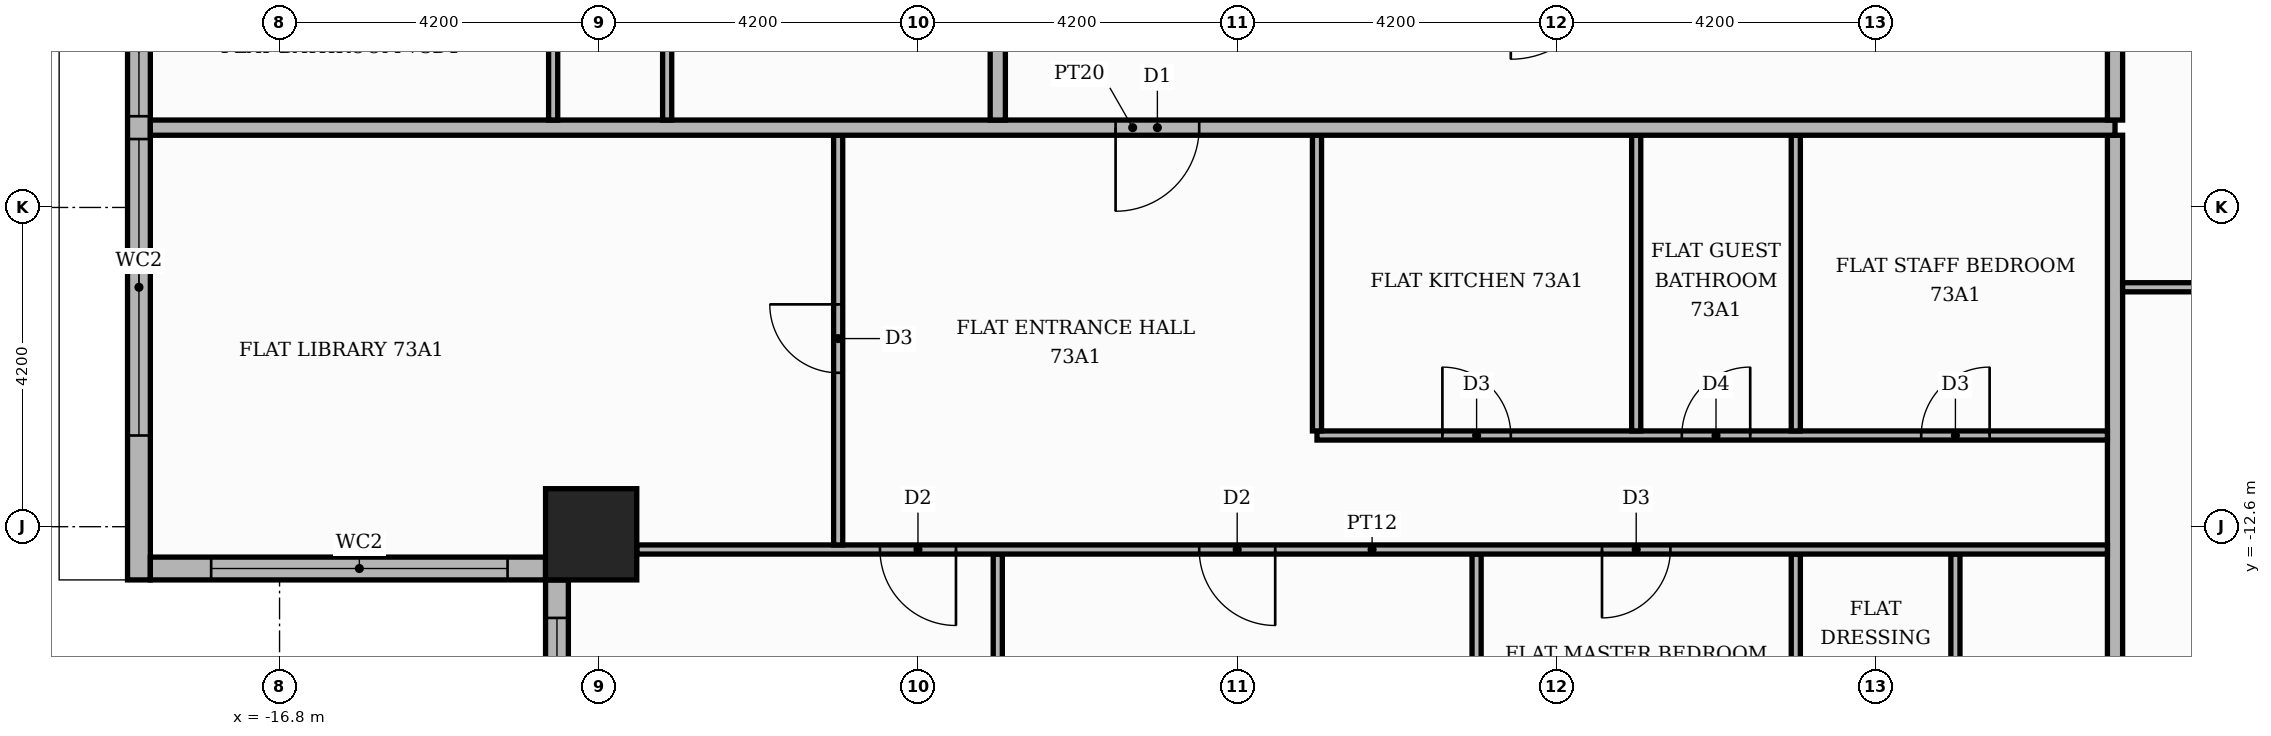
"""IFC4 building model, lengths in metres.
Left out: names, types, materials, properties, quantities, classifications, styles, units other than length and angle.
Written with IfcOpenShell. Run it as: python <this file> out.ifc"""

import sys

from ifc_helpers import new_model, si_unit, direction, frame, frame_2d, origin, origin_2d, place, context, subcontext, project, spatial, rectangle, extrude, element, fill, save


model = new_model("IFC4")
c1 = context("Model", 3, precision=1e-05, world=origin(), true_north=direction((0.0, 1.0)))
c2 = subcontext(c1, "Body", "Model", "MODEL_VIEW")
j1 = project(units=[si_unit("LENGTHUNIT", "METRE"), si_unit("PLANEANGLEUNIT", "RADIAN")], contexts=[c1])
p1 = place(None, origin())
s1 = spatial("IfcSite", under=j1, at=p1, CompositionType="ELEMENT")
p2 = place(p1, origin())
s2 = spatial("IfcBuilding", under=s1, at=p2, CompositionType="ELEMENT")
p3 = place(p2, frame((0.0, 0.0, 304.5)))
s3 = spatial("IfcBuildingStorey", under=s2, at=p3, CompositionType="ELEMENT", Elevation=304.5)
p4 = place(p3, frame((-12.7, -12.7, 0.0), z_axis=(0.0, 0.0, 1.0), x_axis=(1.0, 0.0, 0.0)))
e1 = element("IfcColumn", 1, at=p4, inside=s3, PredefinedType="COLUMN", context=c2, shape_type="SweptSolid", body=[
    extrude(rectangle(XDim=1.2, YDim=1.2, at=origin_2d()), origin(), (0.0, 0.0, 1.0), 3.9),
])
p5 = place(p3, frame((-18.65, 13.0, 0.0), z_axis=(0.0, 0.0, 1.0), x_axis=(0.0, -1.0, 0.0)))
e2 = element("IfcWall", 2, at=p5, inside=s3, PredefinedType="STANDARD", context=c2, shape_type="SweptSolid", body=[
    extrude(rectangle(XDim=26.3, YDim=0.3, at=frame_2d((13.15, 0.0))), origin(), (0.0, 0.0, 1.0), 3.55),
])
p6 = place(p5, frame((1.6, 0.0, 0.6)))
e3 = element("IfcOpeningElement", 3, at=p6, cuts=e2, PredefinedType="OPENING", context=c2, shape_type="SweptSolid", body=[
    extrude(rectangle(XDim=6.0, YDim=2.4, at=frame_2d((3.0, 1.2))), frame((0.0, 0.16, 0.0), z_axis=(0.0, -1.0, 0.0), x_axis=(1.0, 0.0, 0.0)), (0.0, 0.0, 1.0), 0.32),
])
p7 = place(p5, frame((7.9, 0.0, 0.6)))
e4 = element("IfcOpeningElement", 4, at=p7, cuts=e2, PredefinedType="OPENING", context=c2, shape_type="SweptSolid", body=[
    extrude(rectangle(XDim=6.0, YDim=2.4, at=frame_2d((3.0, 1.2))), frame((0.0, 0.16, 0.0), z_axis=(0.0, -1.0, 0.0), x_axis=(1.0, 0.0, 0.0)), (0.0, 0.0, 1.0), 0.32),
])
p8 = place(p5, frame((14.2, 0.0, 0.6)))
e5 = element("IfcOpeningElement", 5, at=p8, cuts=e2, PredefinedType="OPENING", context=c2, shape_type="SweptSolid", body=[
    extrude(rectangle(XDim=1.8, YDim=2.4, at=frame_2d((0.9, 1.2))), frame((0.0, 0.16, 0.0), z_axis=(0.0, -1.0, 0.0), x_axis=(1.0, 0.0, 0.0)), (0.0, 0.0, 1.0), 0.32),
])
p9 = place(p5, frame((16.3, 0.0, 0.6)))
e6 = element("IfcOpeningElement", 6, at=p9, cuts=e2, PredefinedType="OPENING", context=c2, shape_type="SweptSolid", body=[
    extrude(rectangle(XDim=1.8, YDim=2.4, at=frame_2d((0.9, 1.2))), frame((0.0, 0.16, 0.0), z_axis=(0.0, -1.0, 0.0), x_axis=(1.0, 0.0, 0.0)), (0.0, 0.0, 1.0), 0.32),
])
p10 = place(p5, frame((18.4, 0.0, 0.6)))
e7 = element("IfcOpeningElement", 7, at=p10, cuts=e2, PredefinedType="OPENING", context=c2, shape_type="SweptSolid", body=[
    extrude(rectangle(XDim=1.8, YDim=2.4, at=frame_2d((0.9, 1.2))), frame((0.0, 0.16, 0.0), z_axis=(0.0, -1.0, 0.0), x_axis=(1.0, 0.0, 0.0)), (0.0, 0.0, 1.0), 0.32),
])
p11 = place(p5, frame((20.5, 0.0, 0.6)))
e8 = element("IfcOpeningElement", 8, at=p11, cuts=e2, PredefinedType="OPENING", context=c2, shape_type="SweptSolid", body=[
    extrude(rectangle(XDim=3.9, YDim=2.4, at=frame_2d((1.95, 1.2))), frame((0.0, 0.16, 0.0), z_axis=(0.0, -1.0, 0.0), x_axis=(1.0, 0.0, 0.0)), (0.0, 0.0, 1.0), 0.32),
])
p12 = place(p3, frame((-18.5, -13.15, 0.0), z_axis=(0.0, 0.0, 1.0), x_axis=(1.0, 0.0, 0.0)))
e9 = element("IfcWall", 9, at=p12, inside=s3, PredefinedType="STANDARD", context=c2, shape_type="SweptSolid", body=[
    extrude(rectangle(XDim=5.2, YDim=0.3, at=frame_2d((2.6, 0.0))), origin(), (0.0, 0.0, 1.0), 3.55),
])
p13 = place(p12, frame((0.8, 0.0, 0.6)))
e10 = element("IfcOpeningElement", 10, at=p13, cuts=e9, PredefinedType="OPENING", context=c2, shape_type="SweptSolid", body=[
    extrude(rectangle(XDim=3.9, YDim=2.4, at=frame_2d((1.95, 1.2))), frame((0.0, 0.16, 0.0), z_axis=(0.0, -1.0, 0.0), x_axis=(1.0, 0.0, 0.0)), (0.0, 0.0, 1.0), 0.32),
])
p14 = place(p3, frame((-13.15, -13.3, 0.0), z_axis=(0.0, 0.0, 1.0), x_axis=(0.0, -1.0, 0.0)))
e11 = element("IfcWall", 11, at=p14, inside=s3, PredefinedType="STANDARD", context=c2, shape_type="SweptSolid", body=[
    extrude(rectangle(XDim=5.5, YDim=0.3, at=frame_2d((2.75, 0.0))), origin(), (0.0, 0.0, 1.0), 3.55),
])
p15 = place(p14, frame((0.5, 0.0, 0.6)))
e12 = element("IfcOpeningElement", 12, at=p15, cuts=e11, PredefinedType="OPENING", context=c2, shape_type="SweptSolid", body=[
    extrude(rectangle(XDim=3.9, YDim=2.4, at=frame_2d((1.95, 1.2))), frame((0.0, 0.16, 0.0), z_axis=(0.0, -1.0, 0.0), x_axis=(1.0, 0.0, 0.0)), (0.0, 0.0, 1.0), 0.32),
])
p16 = place(p3, frame((-7.35, -18.5, 0.0), z_axis=(0.0, 0.0, 1.0), x_axis=(0.0, 1.0, 0.0)))
e13 = element("IfcWall", 13, at=p16, inside=s3, PredefinedType="PARTITIONING", context=c2, shape_type="SweptSolid", body=[
    extrude(rectangle(XDim=5.54, YDim=0.12, at=frame_2d((2.77, 0.0))), origin(), (0.0, 0.0, 1.0), 3.55),
])
p17 = place(p3, frame((3.15, -18.5, 0.0), z_axis=(0.0, 0.0, 1.0), x_axis=(0.0, 1.0, 0.0)))
e14 = element("IfcWall", 14, at=p17, inside=s3, PredefinedType="PARTITIONING", context=c2, shape_type="SweptSolid", body=[
    extrude(rectangle(XDim=5.54, YDim=0.12, at=frame_2d((2.77, 0.0))), origin(), (0.0, 0.0, 1.0), 3.55),
])
p18 = place(p17, frame((2.2, 0.0, 0.0)))
e15 = element("IfcOpeningElement", 15, at=p18, cuts=e14, PredefinedType="OPENING", context=c2, shape_type="SweptSolid", body=[
    extrude(rectangle(XDim=0.9, YDim=2.1, at=frame_2d((0.45, 1.05))), frame((0.0, 0.07, 0.0), z_axis=(0.0, -1.0, 0.0), x_axis=(1.0, 0.0, 0.0)), (0.0, 0.0, 1.0), 0.14),
])
p19 = place(p3, frame((5.25, -18.5, 0.0), z_axis=(0.0, 0.0, 1.0), x_axis=(0.0, 1.0, 0.0)))
e16 = element("IfcWall", 16, at=p19, inside=s3, PredefinedType="PARTITIONING", context=c2, shape_type="SweptSolid", body=[
    extrude(rectangle(XDim=5.54, YDim=0.12, at=frame_2d((2.77, 0.0))), origin(), (0.0, 0.0, 1.0), 3.55),
])
p20 = place(p19, frame((2.2, 0.0, 0.0)))
e17 = element("IfcOpeningElement", 17, at=p20, cuts=e16, PredefinedType="OPENING", context=c2, shape_type="SweptSolid", body=[
    extrude(rectangle(XDim=0.9, YDim=2.1, at=frame_2d((0.45, 1.05))), frame((0.0, 0.07, 0.0), z_axis=(0.0, -1.0, 0.0), x_axis=(1.0, 0.0, 0.0)), (0.0, 0.0, 1.0), 0.14),
])
p21 = place(p3, frame((7.35, -18.5, 0.0), z_axis=(0.0, 0.0, 1.0), x_axis=(0.0, 1.0, 0.0)))
e18 = element("IfcWall", 18, at=p21, inside=s3, PredefinedType="PARTITIONING", context=c2, shape_type="SweptSolid", body=[
    extrude(rectangle(XDim=11.05, YDim=0.2, at=frame_2d((5.525, 0.0))), origin(), (0.0, 0.0, 1.0), 3.55),
])
p22 = place(p3, frame((-1.05, -16.889, 0.0), z_axis=(0.0, 0.0, 1.0), x_axis=(0.0, 1.0, 0.0)))
e19 = element("IfcWall", 19, at=p22, inside=s3, PredefinedType="PARTITIONING", context=c2, shape_type="SweptSolid", body=[
    extrude(rectangle(XDim=3.929, YDim=0.12, at=frame_2d((1.964, 0.0))), origin(), (0.0, 0.0, 1.0), 3.55),
])
p23 = place(p3, frame((-12.1, -12.9, 0.0), z_axis=(0.0, 0.0, 1.0), x_axis=(1.0, 0.0, 0.0)))
e20 = element("IfcWall", 20, at=p23, inside=s3, PredefinedType="PARTITIONING", context=c2, shape_type="SweptSolid", body=[
    extrude(rectangle(XDim=19.35, YDim=0.12, at=frame_2d((9.675, 0.0))), origin(), (0.0, 0.0, 1.0), 3.55),
])
p24 = place(p23, frame((3.2, 0.0, 0.0)))
e21 = element("IfcOpeningElement", 21, at=p24, cuts=e20, PredefinedType="OPENING", context=c2, shape_type="SweptSolid", body=[
    extrude(rectangle(XDim=1.0, YDim=2.1, at=frame_2d((0.5, 1.05))), frame((0.0, 0.07, 0.0), z_axis=(0.0, -1.0, 0.0), x_axis=(1.0, 0.0, 0.0)), (0.0, 0.0, 1.0), 0.14),
])
p25 = place(p23, frame((7.4, 0.0, 0.0)))
e22 = element("IfcOpeningElement", 22, at=p25, cuts=e20, PredefinedType="OPENING", context=c2, shape_type="SweptSolid", body=[
    extrude(rectangle(XDim=1.0, YDim=2.1, at=frame_2d((0.5, 1.05))), frame((0.0, 0.07, 0.0), z_axis=(0.0, -1.0, 0.0), x_axis=(1.0, 0.0, 0.0)), (0.0, 0.0, 1.0), 0.14),
])
p26 = place(p23, frame((12.7, 0.0, 0.0)))
e23 = element("IfcOpeningElement", 23, at=p26, cuts=e20, PredefinedType="OPENING", context=c2, shape_type="SweptSolid", body=[
    extrude(rectangle(XDim=0.9, YDim=2.1, at=frame_2d((0.45, 1.05))), frame((0.0, 0.07, 0.0), z_axis=(0.0, -1.0, 0.0), x_axis=(1.0, 0.0, 0.0)), (0.0, 0.0, 1.0), 0.14),
])
p27 = place(p3, frame((-9.45, -12.84, 0.0), z_axis=(0.0, 0.0, 1.0), x_axis=(0.0, 1.0, 0.0)))
e24 = element("IfcWall", 24, at=p27, inside=s3, PredefinedType="PARTITIONING", context=c2, shape_type="SweptSolid", body=[
    extrude(rectangle(XDim=5.39, YDim=0.12, at=frame_2d((2.695, 0.0))), origin(), (0.0, 0.0, 1.0), 3.55),
])
p28 = place(p27, frame((2.265, 0.0, 0.0)))
e25 = element("IfcOpeningElement", 25, at=p28, cuts=e24, PredefinedType="OPENING", context=c2, shape_type="SweptSolid", body=[
    extrude(rectangle(XDim=0.9, YDim=2.1, at=frame_2d((0.45, 1.05))), frame((0.0, 0.07, 0.0), z_axis=(0.0, -1.0, 0.0), x_axis=(1.0, 0.0, 0.0)), (0.0, 0.0, 1.0), 0.14),
])
p29 = place(p3, frame((-3.15, -11.4, 0.0), z_axis=(0.0, 0.0, 1.0), x_axis=(1.0, 0.0, 0.0)))
e26 = element("IfcWall", 26, at=p29, inside=s3, PredefinedType="PARTITIONING", context=c2, shape_type="SweptSolid", body=[
    extrude(rectangle(XDim=10.4, YDim=0.12, at=frame_2d((5.2, 0.0))), origin(), (0.0, 0.0, 1.0), 3.55),
])
p30 = place(p29, frame((1.65, 0.0, 0.0)))
e27 = element("IfcOpeningElement", 27, at=p30, cuts=e26, PredefinedType="OPENING", context=c2, shape_type="SweptSolid", body=[
    extrude(rectangle(XDim=0.9, YDim=2.1, at=frame_2d((0.45, 1.05))), frame((0.0, 0.07, 0.0), z_axis=(0.0, -1.0, 0.0), x_axis=(1.0, 0.0, 0.0)), (0.0, 0.0, 1.0), 0.14),
])
p31 = place(p29, frame((4.8, 0.0, 0.0)))
e28 = element("IfcOpeningElement", 28, at=p31, cuts=e26, PredefinedType="OPENING", context=c2, shape_type="SweptSolid", body=[
    extrude(rectangle(XDim=0.9, YDim=2.1, at=frame_2d((0.45, 1.05))), frame((0.0, 0.07, 0.0), z_axis=(0.0, -1.0, 0.0), x_axis=(1.0, 0.0, 0.0)), (0.0, 0.0, 1.0), 0.14),
])
p32 = place(p29, frame((7.95, 0.0, 0.0)))
e29 = element("IfcOpeningElement", 29, at=p32, cuts=e26, PredefinedType="OPENING", context=c2, shape_type="SweptSolid", body=[
    extrude(rectangle(XDim=0.9, YDim=2.1, at=frame_2d((0.45, 1.05))), frame((0.0, 0.07, 0.0), z_axis=(0.0, -1.0, 0.0), x_axis=(1.0, 0.0, 0.0)), (0.0, 0.0, 1.0), 0.14),
])
for number, where, z_axis, x_axis in (
    (30, (-3.15, -11.34, 0.0), (0.0, 0.0, 1.0), (0.0, 1.0, 0.0)),
    (31, (1.05, -11.34, 0.0), (0.0, 0.0, 1.0), (0.0, 1.0, 0.0)),
    (32, (3.15, -11.34, 0.0), (0.0, 0.0, 1.0), (0.0, 1.0, 0.0)),
):
    element("IfcWall", number, at=place(p3, frame(where, z_axis=z_axis, x_axis=x_axis)), inside=s3, PredefinedType="PARTITIONING", context=c2, shape_type="SweptSolid", body=[
        extrude(rectangle(XDim=3.89, YDim=0.12, at=frame_2d((1.945, 0.0))), origin(), (0.0, 0.0, 1.0), 3.55),
    ])
p33 = place(p3, frame((7.45, -9.45, 0.0), z_axis=(0.0, 0.0, 1.0), x_axis=(1.0, 0.0, 0.0)))
e33 = element("IfcWall", 33, at=p33, inside=s3, PredefinedType="PARTITIONING", context=c2, shape_type="SweptSolid", body=[
    extrude(rectangle(XDim=6.05, YDim=0.12, at=frame_2d((3.025, 0.0))), origin(), (0.0, 0.0, 1.0), 3.55),
])
p34 = place(p33, frame((2.475, 0.0, 0.0)))
e34 = element("IfcOpeningElement", 34, at=p34, cuts=e33, PredefinedType="OPENING", context=c2, shape_type="SweptSolid", body=[
    extrude(rectangle(XDim=1.0, YDim=2.1, at=frame_2d((0.5, 1.05))), frame((0.0, 0.07, 0.0), z_axis=(0.0, -1.0, 0.0), x_axis=(1.0, 0.0, 0.0)), (0.0, 0.0, 1.0), 0.14),
])
p35 = place(p3, frame((-18.5, -7.35, 0.0), z_axis=(0.0, 0.0, 1.0), x_axis=(1.0, 0.0, 0.0)))
e35 = element("IfcWall", 35, at=p35, inside=s3, PredefinedType="PARTITIONING", context=c2, shape_type="SweptSolid", body=[
    extrude(rectangle(XDim=25.85, YDim=0.2, at=frame_2d((12.925, 0.0))), origin(), (0.0, 0.0, 1.0), 3.55),
])
p36 = place(p35, frame((12.7, 0.0, 0.0)))
e36 = element("IfcOpeningElement", 36, at=p36, cuts=e35, PredefinedType="OPENING", context=c2, shape_type="SweptSolid", body=[
    extrude(rectangle(XDim=1.1, YDim=2.4, at=frame_2d((0.55, 1.2))), frame((0.0, 0.11, 0.0), z_axis=(0.0, -1.0, 0.0), x_axis=(1.0, 0.0, 0.0)), (0.0, 0.0, 1.0), 0.22),
])
p37 = place(p3, frame((-13.2, -7.25, 0.0), z_axis=(0.0, 0.0, 1.0), x_axis=(0.0, 1.0, 0.0)))
e37 = element("IfcWall", 37, at=p37, inside=s3, PredefinedType="PARTITIONING", context=c2, shape_type="SweptSolid", body=[
    extrude(rectangle(XDim=1.94, YDim=0.12, at=frame_2d((0.97, 0.0))), origin(), (0.0, 0.0, 1.0), 3.55),
])
p38 = place(p3, frame((-11.7, -7.25, 0.0), z_axis=(0.0, 0.0, 1.0), x_axis=(0.0, 1.0, 0.0)))
e38 = element("IfcWall", 38, at=p38, inside=s3, PredefinedType="PARTITIONING", context=c2, shape_type="SweptSolid", body=[
    extrude(rectangle(XDim=3.44, YDim=0.12, at=frame_2d((1.72, 0.0))), origin(), (0.0, 0.0, 1.0), 3.55),
])
p39 = place(p38, frame((1.25, 0.0, 0.0)))
e39 = element("IfcOpeningElement", 39, at=p39, cuts=e38, PredefinedType="OPENING", context=c2, shape_type="SweptSolid", body=[
    extrude(rectangle(XDim=0.9, YDim=2.1, at=frame_2d((0.45, 1.05))), frame((0.0, 0.07, 0.0), z_axis=(0.0, -1.0, 0.0), x_axis=(1.0, 0.0, 0.0)), (0.0, 0.0, 1.0), 0.14),
])
p40 = place(p3, frame((-7.35, -7.25, 0.0), z_axis=(0.0, 0.0, 1.0), x_axis=(0.0, 1.0, 0.0)))
e40 = element("IfcWall", 40, at=p40, inside=s3, PredefinedType="PARTITIONING", context=c2, shape_type="SweptSolid", body=[
    extrude(rectangle(XDim=14.5, YDim=0.2, at=frame_2d((7.25, 0.0))), origin(), (0.0, 0.0, 1.0), 3.55),
])
p41 = place(p40, frame((10.9, 0.0, 0.0)))
e41 = element("IfcOpeningElement", 41, at=p41, cuts=e40, PredefinedType="OPENING", context=c2, shape_type="SweptSolid", body=[
    extrude(rectangle(XDim=1.1, YDim=2.4, at=frame_2d((0.55, 1.2))), frame((0.0, 0.11, 0.0), z_axis=(0.0, -1.0, 0.0), x_axis=(1.0, 0.0, 0.0)), (0.0, 0.0, 1.0), 0.22),
])
p42 = place(p3, frame((7.35, -7.25, 0.0), z_axis=(0.0, 0.0, 1.0), x_axis=(0.0, 1.0, 0.0)))
e42 = element("IfcWall", 42, at=p42, inside=s3, PredefinedType="PARTITIONING", context=c2, shape_type="SweptSolid", body=[
    extrude(rectangle(XDim=14.5, YDim=0.2, at=frame_2d((7.25, 0.0))), origin(), (0.0, 0.0, 1.0), 3.55),
])
p43 = place(p42, frame((1.45, 0.0, 0.0)))
e43 = element("IfcOpeningElement", 43, at=p43, cuts=e42, PredefinedType="OPENING", context=c2, shape_type="SweptSolid", body=[
    extrude(rectangle(XDim=1.1, YDim=2.4, at=frame_2d((0.55, 1.2))), frame((0.0, 0.11, 0.0), z_axis=(0.0, -1.0, 0.0), x_axis=(1.0, 0.0, 0.0)), (0.0, 0.0, 1.0), 0.22),
])
p44 = place(p10, origin())
e44 = element("IfcWindow", 44, at=p44, inside=s3, PartitioningType="SINGLE_PANEL", PredefinedType="WINDOW", context=c2, shape_type="SweptSolid", body=[
    extrude(rectangle(XDim=1.8, YDim=2.4, at=frame_2d((0.9, 1.2))), frame((0.0, 0.03, 0.0), z_axis=(0.0, -1.0, 0.0), x_axis=(1.0, 0.0, 0.0)), (0.0, 0.0, 1.0), 0.06),
])
fill(e7, e44)
p45 = place(p11, origin())
e45 = element("IfcWindow", 45, at=p45, inside=s3, PartitioningType="SINGLE_PANEL", PredefinedType="WINDOW", context=c2, shape_type="SweptSolid", body=[
    extrude(rectangle(XDim=3.9, YDim=2.4, at=frame_2d((1.95, 1.2))), frame((0.0, 0.03, 0.0), z_axis=(0.0, -1.0, 0.0), x_axis=(1.0, 0.0, 0.0)), (0.0, 0.0, 1.0), 0.06),
])
fill(e8, e45)
p46 = place(p13, origin())
e46 = element("IfcWindow", 46, at=p46, inside=s3, PartitioningType="SINGLE_PANEL", PredefinedType="WINDOW", context=c2, shape_type="SweptSolid", body=[
    extrude(rectangle(XDim=3.9, YDim=2.4, at=frame_2d((1.95, 1.2))), frame((0.0, 0.03, 0.0), z_axis=(0.0, -1.0, 0.0), x_axis=(1.0, 0.0, 0.0)), (0.0, 0.0, 1.0), 0.06),
])
fill(e10, e46)
p47 = place(p15, origin())
e47 = element("IfcWindow", 47, at=p47, inside=s3, PartitioningType="SINGLE_PANEL", PredefinedType="WINDOW", context=c2, shape_type="SweptSolid", body=[
    extrude(rectangle(XDim=3.9, YDim=2.4, at=frame_2d((1.95, 1.2))), frame((0.0, 0.03, 0.0), z_axis=(0.0, -1.0, 0.0), x_axis=(1.0, 0.0, 0.0)), (0.0, 0.0, 1.0), 0.06),
])
fill(e12, e47)
p48 = place(p36, frame((1.1, 0.0, 0.0), z_axis=(0.0, 0.0, 1.0), x_axis=(-1.0, 0.0, 0.0)))
e48 = element("IfcDoor", 48, at=p48, inside=s3, OperationType="SINGLE_SWING_LEFT", PredefinedType="DOOR", context=c2, shape_type="SweptSolid", body=[
    extrude(rectangle(XDim=1.1, YDim=2.4, at=frame_2d((0.55, 1.2))), frame((0.0, 0.025, 0.0), z_axis=(0.0, -1.0, 0.0), x_axis=(1.0, 0.0, 0.0)), (0.0, 0.0, 1.0), 0.05),
])
fill(e36, e48)
p49 = place(p28, origin())
e49 = element("IfcDoor", 49, at=p49, inside=s3, OperationType="SINGLE_SWING_RIGHT", PredefinedType="DOOR", context=c2, shape_type="SweptSolid", body=[
    extrude(rectangle(XDim=0.9, YDim=2.1, at=frame_2d((0.45, 1.05))), frame((0.0, 0.025, 0.0), z_axis=(0.0, -1.0, 0.0), x_axis=(1.0, 0.0, 0.0)), (0.0, 0.0, 1.0), 0.05),
])
fill(e25, e49)
p50 = place(p30, origin())
e50 = element("IfcDoor", 50, at=p50, inside=s3, OperationType="SINGLE_SWING_LEFT", PredefinedType="DOOR", context=c2, shape_type="SweptSolid", body=[
    extrude(rectangle(XDim=0.9, YDim=2.1, at=frame_2d((0.45, 1.05))), frame((0.0, 0.025, 0.0), z_axis=(0.0, -1.0, 0.0), x_axis=(1.0, 0.0, 0.0)), (0.0, 0.0, 1.0), 0.05),
])
fill(e27, e50)
p51 = place(p31, origin())
e51 = element("IfcDoor", 51, at=p51, inside=s3, OperationType="SINGLE_SWING_RIGHT", PredefinedType="DOOR", context=c2, shape_type="SweptSolid", body=[
    extrude(rectangle(XDim=0.9, YDim=2.1, at=frame_2d((0.45, 1.05))), frame((0.0, 0.025, 0.0), z_axis=(0.0, -1.0, 0.0), x_axis=(1.0, 0.0, 0.0)), (0.0, 0.0, 1.0), 0.05),
])
fill(e28, e51)
p52 = place(p32, origin())
e52 = element("IfcDoor", 52, at=p52, inside=s3, OperationType="SINGLE_SWING_RIGHT", PredefinedType="DOOR", context=c2, shape_type="SweptSolid", body=[
    extrude(rectangle(XDim=0.9, YDim=2.1, at=frame_2d((0.45, 1.05))), frame((0.0, 0.025, 0.0), z_axis=(0.0, -1.0, 0.0), x_axis=(1.0, 0.0, 0.0)), (0.0, 0.0, 1.0), 0.05),
])
fill(e29, e52)
p53 = place(p24, frame((1.0, 0.0, 0.0), z_axis=(0.0, 0.0, 1.0), x_axis=(-1.0, 0.0, 0.0)))
e53 = element("IfcDoor", 53, at=p53, inside=s3, OperationType="SINGLE_SWING_RIGHT", PredefinedType="DOOR", context=c2, shape_type="SweptSolid", body=[
    extrude(rectangle(XDim=1.0, YDim=2.1, at=frame_2d((0.5, 1.05))), frame((0.0, 0.025, 0.0), z_axis=(0.0, -1.0, 0.0), x_axis=(1.0, 0.0, 0.0)), (0.0, 0.0, 1.0), 0.05),
])
fill(e21, e53)
p54 = place(p25, frame((1.0, 0.0, 0.0), z_axis=(0.0, 0.0, 1.0), x_axis=(-1.0, 0.0, 0.0)))
e54 = element("IfcDoor", 54, at=p54, inside=s3, OperationType="SINGLE_SWING_RIGHT", PredefinedType="DOOR", context=c2, shape_type="SweptSolid", body=[
    extrude(rectangle(XDim=1.0, YDim=2.1, at=frame_2d((0.5, 1.05))), frame((0.0, 0.025, 0.0), z_axis=(0.0, -1.0, 0.0), x_axis=(1.0, 0.0, 0.0)), (0.0, 0.0, 1.0), 0.05),
])
fill(e22, e54)
p55 = place(p26, frame((0.9, 0.0, 0.0), z_axis=(0.0, 0.0, 1.0), x_axis=(-1.0, 0.0, 0.0)))
e55 = element("IfcDoor", 55, at=p55, inside=s3, OperationType="SINGLE_SWING_LEFT", PredefinedType="DOOR", context=c2, shape_type="SweptSolid", body=[
    extrude(rectangle(XDim=0.9, YDim=2.1, at=frame_2d((0.45, 1.05))), frame((0.0, 0.025, 0.0), z_axis=(0.0, -1.0, 0.0), x_axis=(1.0, 0.0, 0.0)), (0.0, 0.0, 1.0), 0.05),
])
fill(e23, e55)
save(model, sys.argv[1])
